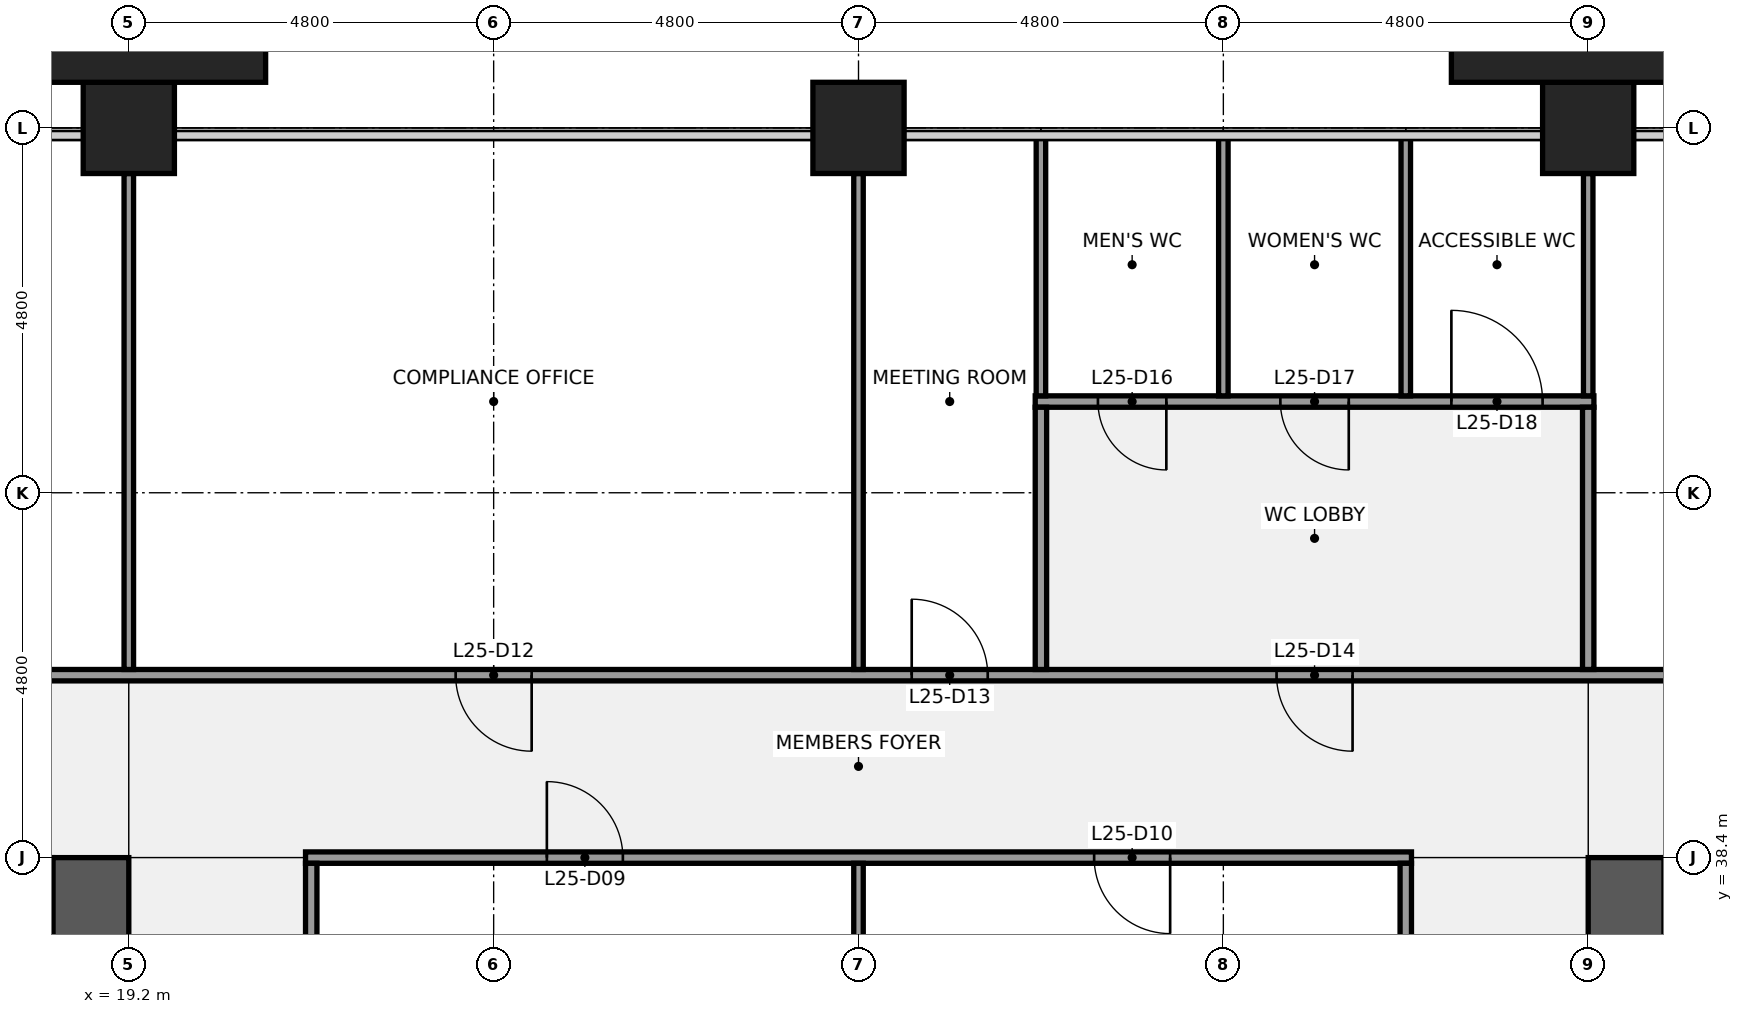
"""IFC4 building model, lengths in metres.
Left out: names, types, materials, properties, quantities, classifications, styles, units other than length and angle.
Written with IfcOpenShell. Run it as: python <this file> out.ifc"""

import sys

from ifc_helpers import new_model, si_unit, direction, frame, frame_2d, origin, origin_2d, place, context, subcontext, project, spatial, rectangle, extrude, element, fill, save


model = new_model("IFC4")
c1 = context("Model", 3, precision=1e-05, world=origin(), true_north=direction((0.0, 1.0)))
c2 = subcontext(c1, "Body", "Model", "MODEL_VIEW")
j1 = project(units=[si_unit("LENGTHUNIT", "METRE"), si_unit("PLANEANGLEUNIT", "RADIAN")], contexts=[c1])
p1 = place(None, origin())
s1 = spatial("IfcSite", under=j1, at=p1, CompositionType="ELEMENT")
p2 = place(p1, origin())
s2 = spatial("IfcBuilding", under=s1, at=p2, CompositionType="ELEMENT")
p3 = place(p2, frame((0.0, 0.0, 120.1)))
s3 = spatial("IfcBuildingStorey", under=s2, at=p3, CompositionType="ELEMENT", Elevation=120.1)
for number, where, z_axis, x_axis in (
    (1, (19.2, 48.0, 0.0), (0.0, 0.0, 1.0), (1.0, 0.0, 0.0)),
    (2, (28.8, 48.0, 0.0), (0.0, 0.0, 1.0), (1.0, 0.0, 0.0)),
    (3, (38.4, 48.0, 0.0), (0.0, 0.0, 1.0), (1.0, 0.0, 0.0)),
):
    element("IfcColumn", number, at=place(p3, frame(where, z_axis=z_axis, x_axis=x_axis)), inside=s3, PredefinedType="COLUMN", context=c2, shape_type="SweptSolid", body=[
        extrude(rectangle(XDim=1.2, YDim=1.2, at=origin_2d()), origin(), (0.0, 0.0, 1.0), 4.0),
    ])
p4 = place(p3, frame((18.7, 38.4, 0.0), z_axis=(0.0, 0.0, 1.0), x_axis=(0.0, -1.0, 0.0)))
e4 = element("IfcWall", 4, at=p4, inside=s3, PredefinedType="SHEAR", context=c2, shape_type="SweptSolid", body=[
    extrude(rectangle(XDim=28.8, YDim=1.0, at=frame_2d((14.4, 0.0))), origin(), (0.0, 0.0, 1.0), 3.84),
])
p5 = place(p4, frame((18.3, 0.0, 0.0)))
e5 = element("IfcOpeningElement", 5, at=p5, cuts=e4, PredefinedType="OPENING", context=c2, shape_type="SweptSolid", body=[
    extrude(rectangle(XDim=1.8, YDim=2.1, at=frame_2d((0.9, 1.05))), frame((0.0, 0.51, 0.0), z_axis=(0.0, -1.0, 0.0), x_axis=(1.0, 0.0, 0.0)), (0.0, 0.0, 1.0), 1.02),
])
p6 = place(p4, frame((8.7, 0.0, 0.0)))
e6 = element("IfcOpeningElement", 6, at=p6, cuts=e4, PredefinedType="OPENING", context=c2, shape_type="SweptSolid", body=[
    extrude(rectangle(XDim=1.8, YDim=2.1, at=frame_2d((0.9, 1.05))), frame((0.0, 0.51, 0.0), z_axis=(0.0, -1.0, 0.0), x_axis=(1.0, 0.0, 0.0)), (0.0, 0.0, 1.0), 1.02),
])
p7 = place(p3, frame((38.9, 9.6, 0.0), z_axis=(0.0, 0.0, 1.0), x_axis=(0.0, 1.0, 0.0)))
e7 = element("IfcWall", 7, at=p7, inside=s3, PredefinedType="SHEAR", context=c2, shape_type="SweptSolid", body=[
    extrude(rectangle(XDim=28.8, YDim=1.0, at=frame_2d((14.4, 0.0))), origin(), (0.0, 0.0, 1.0), 3.84),
])
p8 = place(p7, frame((8.7, 0.0, 0.0)))
e8 = element("IfcOpeningElement", 8, at=p8, cuts=e7, PredefinedType="OPENING", context=c2, shape_type="SweptSolid", body=[
    extrude(rectangle(XDim=1.8, YDim=2.1, at=frame_2d((0.9, 1.05))), frame((0.0, 0.51, 0.0), z_axis=(0.0, -1.0, 0.0), x_axis=(1.0, 0.0, 0.0)), (0.0, 0.0, 1.0), 1.02),
])
p9 = place(p7, frame((18.3, 0.0, 0.0)))
e9 = element("IfcOpeningElement", 9, at=p9, cuts=e7, PredefinedType="OPENING", context=c2, shape_type="SweptSolid", body=[
    extrude(rectangle(XDim=1.8, YDim=2.1, at=frame_2d((0.9, 1.05))), frame((0.0, 0.51, 0.0), z_axis=(0.0, -1.0, 0.0), x_axis=(1.0, 0.0, 0.0)), (0.0, 0.0, 1.0), 1.02),
])
p10 = place(p3, frame((21.525, 38.4, 0.0), z_axis=(0.0, 0.0, 1.0), x_axis=(1.0, 0.0, 0.0)))
e10 = element("IfcWall", 10, at=p10, inside=s3, PredefinedType="PARTITIONING", context=c2, shape_type="SweptSolid", body=[
    extrude(rectangle(XDim=14.55, YDim=0.15, at=frame_2d((7.275, 0.0))), origin(), (0.0, 0.0, 1.0), 2.936),
])
p11 = place(p10, frame((3.175, 0.0, 0.0)))
e11 = element("IfcOpeningElement", 11, at=p11, cuts=e10, PredefinedType="OPENING", context=c2, shape_type="SweptSolid", body=[
    extrude(rectangle(XDim=1.0, YDim=2.1, at=frame_2d((0.5, 1.05))), frame((0.0, 0.085, 0.0), z_axis=(0.0, -1.0, 0.0), x_axis=(1.0, 0.0, 0.0)), (0.0, 0.0, 1.0), 0.17),
])
p12 = place(p10, frame((10.375, 0.0, 0.0)))
e12 = element("IfcOpeningElement", 12, at=p12, cuts=e10, PredefinedType="OPENING", context=c2, shape_type="SweptSolid", body=[
    extrude(rectangle(XDim=1.0, YDim=2.1, at=frame_2d((0.5, 1.05))), frame((0.0, 0.085, 0.0), z_axis=(0.0, -1.0, 0.0), x_axis=(1.0, 0.0, 0.0)), (0.0, 0.0, 1.0), 0.17),
])
p13 = place(p3, frame((14.325, 40.8, 0.0), z_axis=(0.0, 0.0, 1.0), x_axis=(1.0, 0.0, 0.0)))
e13 = element("IfcWall", 13, at=p13, inside=s3, PredefinedType="PARTITIONING", context=c2, shape_type="SweptSolid", body=[
    extrude(rectangle(XDim=28.95, YDim=0.15, at=frame_2d((14.475, 0.0))), origin(), (0.0, 0.0, 1.0), 2.936),
])
p14 = place(p13, frame((1.975, 0.0, 0.0)))
e14 = element("IfcOpeningElement", 14, at=p14, cuts=e13, PredefinedType="OPENING", context=c2, shape_type="SweptSolid", body=[
    extrude(rectangle(XDim=1.0, YDim=2.1, at=frame_2d((0.5, 1.05))), frame((0.0, 0.085, 0.0), z_axis=(0.0, -1.0, 0.0), x_axis=(1.0, 0.0, 0.0)), (0.0, 0.0, 1.0), 0.17),
])
p15 = place(p13, frame((9.175, 0.0, 0.0)))
e15 = element("IfcOpeningElement", 15, at=p15, cuts=e13, PredefinedType="OPENING", context=c2, shape_type="SweptSolid", body=[
    extrude(rectangle(XDim=1.0, YDim=2.1, at=frame_2d((0.5, 1.05))), frame((0.0, 0.085, 0.0), z_axis=(0.0, -1.0, 0.0), x_axis=(1.0, 0.0, 0.0)), (0.0, 0.0, 1.0), 0.17),
])
p16 = place(p13, frame((15.175, 0.0, 0.0)))
e16 = element("IfcOpeningElement", 16, at=p16, cuts=e13, PredefinedType="OPENING", context=c2, shape_type="SweptSolid", body=[
    extrude(rectangle(XDim=1.0, YDim=2.1, at=frame_2d((0.5, 1.05))), frame((0.0, 0.085, 0.0), z_axis=(0.0, -1.0, 0.0), x_axis=(1.0, 0.0, 0.0)), (0.0, 0.0, 1.0), 0.17),
])
p17 = place(p13, frame((19.975, 0.0, 0.0)))
e17 = element("IfcOpeningElement", 17, at=p17, cuts=e13, PredefinedType="OPENING", context=c2, shape_type="SweptSolid", body=[
    extrude(rectangle(XDim=1.0, YDim=2.1, at=frame_2d((0.5, 1.05))), frame((0.0, 0.085, 0.0), z_axis=(0.0, -1.0, 0.0), x_axis=(1.0, 0.0, 0.0)), (0.0, 0.0, 1.0), 0.17),
])
p18 = place(p13, frame((25.975, 0.0, 0.0)))
e18 = element("IfcOpeningElement", 18, at=p18, cuts=e13, PredefinedType="OPENING", context=c2, shape_type="SweptSolid", body=[
    extrude(rectangle(XDim=1.0, YDim=2.1, at=frame_2d((0.5, 1.05))), frame((0.0, 0.085, 0.0), z_axis=(0.0, -1.0, 0.0), x_axis=(1.0, 0.0, 0.0)), (0.0, 0.0, 1.0), 0.17),
])
p19 = place(p3, frame((31.125, 44.4, 0.0), z_axis=(0.0, 0.0, 1.0), x_axis=(1.0, 0.0, 0.0)))
e19 = element("IfcWall", 19, at=p19, inside=s3, PredefinedType="PARTITIONING", context=c2, shape_type="SweptSolid", body=[
    extrude(rectangle(XDim=7.35, YDim=0.15, at=frame_2d((3.675, 0.0))), origin(), (0.0, 0.0, 1.0), 2.936),
])
p20 = place(p19, frame((0.825, 0.0, 0.0)))
e20 = element("IfcOpeningElement", 20, at=p20, cuts=e19, PredefinedType="OPENING", context=c2, shape_type="SweptSolid", body=[
    extrude(rectangle(XDim=0.9, YDim=2.1, at=frame_2d((0.45, 1.05))), frame((0.0, 0.085, 0.0), z_axis=(0.0, -1.0, 0.0), x_axis=(1.0, 0.0, 0.0)), (0.0, 0.0, 1.0), 0.17),
])
p21 = place(p19, frame((3.225, 0.0, 0.0)))
e21 = element("IfcOpeningElement", 21, at=p21, cuts=e19, PredefinedType="OPENING", context=c2, shape_type="SweptSolid", body=[
    extrude(rectangle(XDim=0.9, YDim=2.1, at=frame_2d((0.45, 1.05))), frame((0.0, 0.085, 0.0), z_axis=(0.0, -1.0, 0.0), x_axis=(1.0, 0.0, 0.0)), (0.0, 0.0, 1.0), 0.17),
])
p22 = place(p19, frame((5.475, 0.0, 0.0)))
e22 = element("IfcOpeningElement", 22, at=p22, cuts=e19, PredefinedType="OPENING", context=c2, shape_type="SweptSolid", body=[
    extrude(rectangle(XDim=1.2, YDim=2.1, at=frame_2d((0.6, 1.05))), frame((0.0, 0.085, 0.0), z_axis=(0.0, -1.0, 0.0), x_axis=(1.0, 0.0, 0.0)), (0.0, 0.0, 1.0), 0.17),
])
p23 = place(p3, frame((19.2, 40.875, 0.0), z_axis=(0.0, 0.0, 1.0), x_axis=(0.0, 1.0, 0.0)))
e23 = element("IfcWall", 23, at=p23, inside=s3, PredefinedType="PARTITIONING", context=c2, shape_type="SweptSolid", body=[
    extrude(rectangle(XDim=6.525, YDim=0.125, at=frame_2d((3.262, 0.0))), origin(), (0.0, 0.0, 1.0), 2.936),
])
p24 = place(p3, frame((21.6, 33.675, 0.0), z_axis=(0.0, 0.0, 1.0), x_axis=(0.0, 1.0, 0.0)))
e24 = element("IfcWall", 24, at=p24, inside=s3, PredefinedType="PARTITIONING", context=c2, shape_type="SweptSolid", body=[
    extrude(rectangle(XDim=4.65, YDim=0.15, at=frame_2d((2.325, 0.0))), origin(), (0.0, 0.0, 1.0), 2.936),
])
p25 = place(p3, frame((28.8, 33.663, 0.0), z_axis=(0.0, 0.0, 1.0), x_axis=(0.0, 1.0, 0.0)))
e25 = element("IfcWall", 25, at=p25, inside=s3, PredefinedType="PARTITIONING", context=c2, shape_type="SweptSolid", body=[
    extrude(rectangle(XDim=4.662, YDim=0.125, at=frame_2d((2.331, 0.0))), origin(), (0.0, 0.0, 1.0), 2.936),
])
p26 = place(p3, frame((28.8, 40.875, 0.0), z_axis=(0.0, 0.0, 1.0), x_axis=(0.0, 1.0, 0.0)))
e26 = element("IfcWall", 26, at=p26, inside=s3, PredefinedType="PARTITIONING", context=c2, shape_type="SweptSolid", body=[
    extrude(rectangle(XDim=6.525, YDim=0.125, at=frame_2d((3.262, 0.0))), origin(), (0.0, 0.0, 1.0), 2.936),
])
p27 = place(p3, frame((31.2, 44.475, 0.0), z_axis=(0.0, 0.0, 1.0), x_axis=(0.0, 1.0, 0.0)))
e27 = element("IfcWall", 27, at=p27, inside=s3, PredefinedType="PARTITIONING", context=c2, shape_type="SweptSolid", body=[
    extrude(rectangle(XDim=3.425, YDim=0.125, at=frame_2d((1.712, 0.0))), origin(), (0.0, 0.0, 1.0), 2.936),
])
p28 = place(p3, frame((31.2, 40.875, 0.0), z_axis=(0.0, 0.0, 1.0), x_axis=(0.0, 1.0, 0.0)))
e28 = element("IfcWall", 28, at=p28, inside=s3, PredefinedType="PARTITIONING", context=c2, shape_type="SweptSolid", body=[
    extrude(rectangle(XDim=3.45, YDim=0.15, at=frame_2d((1.725, 0.0))), origin(), (0.0, 0.0, 1.0), 2.936),
])
for number, where, z_axis, x_axis in (
    (29, (33.6, 44.475, 0.0), (0.0, 0.0, 1.0), (0.0, 1.0, 0.0)),
    (30, (36.0, 44.475, 0.0), (0.0, 0.0, 1.0), (0.0, 1.0, 0.0)),
):
    element("IfcWall", number, at=place(p3, frame(where, z_axis=z_axis, x_axis=x_axis)), inside=s3, PredefinedType="PARTITIONING", context=c2, shape_type="SweptSolid", body=[
        extrude(rectangle(XDim=3.425, YDim=0.125, at=frame_2d((1.712, 0.0))), origin(), (0.0, 0.0, 1.0), 2.936),
    ])
p29 = place(p3, frame((36.0, 33.675, 0.0), z_axis=(0.0, 0.0, 1.0), x_axis=(0.0, 1.0, 0.0)))
e31 = element("IfcWall", 31, at=p29, inside=s3, PredefinedType="PARTITIONING", context=c2, shape_type="SweptSolid", body=[
    extrude(rectangle(XDim=4.65, YDim=0.15, at=frame_2d((2.325, 0.0))), origin(), (0.0, 0.0, 1.0), 2.936),
])
p30 = place(p3, frame((38.4, 44.475, 0.0), z_axis=(0.0, 0.0, 1.0), x_axis=(0.0, 1.0, 0.0)))
e32 = element("IfcWall", 32, at=p30, inside=s3, PredefinedType="PARTITIONING", context=c2, shape_type="SweptSolid", body=[
    extrude(rectangle(XDim=2.925, YDim=0.125, at=frame_2d((1.462, 0.0))), origin(), (0.0, 0.0, 1.0), 2.936),
])
p31 = place(p3, frame((38.4, 40.875, 0.0), z_axis=(0.0, 0.0, 1.0), x_axis=(0.0, 1.0, 0.0)))
e33 = element("IfcWall", 33, at=p31, inside=s3, PredefinedType="PARTITIONING", context=c2, shape_type="SweptSolid", body=[
    extrude(rectangle(XDim=3.45, YDim=0.15, at=frame_2d((1.725, 0.0))), origin(), (0.0, 0.0, 1.0), 2.936),
])
for number, where, z_axis, x_axis in (
    (34, (19.2, 49.05, 0.0), (0.0, 0.0, 1.0), (1.0, 0.0, 0.0)),
    (35, (38.4, 49.05, 0.0), (0.0, 0.0, 1.0), (1.0, 0.0, 0.0)),
):
    element("IfcColumn", number, at=place(p3, frame(where, z_axis=z_axis, x_axis=x_axis)), inside=s3, PredefinedType="PILASTER", context=c2, shape_type="SweptSolid", body=[
        extrude(rectangle(XDim=3.6, YDim=0.9, at=origin_2d()), origin(), (0.0, 0.0, 1.0), 4.0),
    ])
p32 = place(p11, origin())
e36 = element("IfcDoor", 36, at=p32, inside=s3, OperationType="SINGLE_SWING_LEFT", PredefinedType="DOOR", context=c2, shape_type="SweptSolid", body=[
    extrude(rectangle(XDim=1.0, YDim=2.1, at=frame_2d((0.5, 1.05))), frame((0.0, 0.025, 0.0), z_axis=(0.0, -1.0, 0.0), x_axis=(1.0, 0.0, 0.0)), (0.0, 0.0, 1.0), 0.05),
])
fill(e11, e36)
p33 = place(p12, origin())
e37 = element("IfcDoor", 37, at=p33, inside=s3, OperationType="SINGLE_SWING_RIGHT", PredefinedType="DOOR", context=c2, shape_type="SweptSolid", body=[
    extrude(rectangle(XDim=1.0, YDim=2.1, at=frame_2d((0.5, 1.05))), frame((0.0, 0.025, 0.0), z_axis=(0.0, -1.0, 0.0), x_axis=(1.0, 0.0, 0.0)), (0.0, 0.0, 1.0), 0.05),
])
fill(e12, e37)
p34 = place(p15, origin())
e38 = element("IfcDoor", 38, at=p34, inside=s3, OperationType="SINGLE_SWING_RIGHT", PredefinedType="DOOR", context=c2, shape_type="SweptSolid", body=[
    extrude(rectangle(XDim=1.0, YDim=2.1, at=frame_2d((0.5, 1.05))), frame((0.0, 0.025, 0.0), z_axis=(0.0, -1.0, 0.0), x_axis=(1.0, 0.0, 0.0)), (0.0, 0.0, 1.0), 0.05),
])
fill(e15, e38)
p35 = place(p16, origin())
e39 = element("IfcDoor", 39, at=p35, inside=s3, OperationType="SINGLE_SWING_LEFT", PredefinedType="DOOR", context=c2, shape_type="SweptSolid", body=[
    extrude(rectangle(XDim=1.0, YDim=2.1, at=frame_2d((0.5, 1.05))), frame((0.0, 0.025, 0.0), z_axis=(0.0, -1.0, 0.0), x_axis=(1.0, 0.0, 0.0)), (0.0, 0.0, 1.0), 0.05),
])
fill(e16, e39)
p36 = place(p17, origin())
e40 = element("IfcDoor", 40, at=p36, inside=s3, OperationType="SINGLE_SWING_RIGHT", PredefinedType="DOOR", context=c2, shape_type="SweptSolid", body=[
    extrude(rectangle(XDim=1.0, YDim=2.1, at=frame_2d((0.5, 1.05))), frame((0.0, 0.025, 0.0), z_axis=(0.0, -1.0, 0.0), x_axis=(1.0, 0.0, 0.0)), (0.0, 0.0, 1.0), 0.05),
])
fill(e17, e40)
p37 = place(p20, origin())
e41 = element("IfcDoor", 41, at=p37, inside=s3, OperationType="SINGLE_SWING_RIGHT", PredefinedType="DOOR", context=c2, shape_type="SweptSolid", body=[
    extrude(rectangle(XDim=0.9, YDim=2.1, at=frame_2d((0.45, 1.05))), frame((0.0, 0.025, 0.0), z_axis=(0.0, -1.0, 0.0), x_axis=(1.0, 0.0, 0.0)), (0.0, 0.0, 1.0), 0.05),
])
fill(e20, e41)
p38 = place(p21, origin())
e42 = element("IfcDoor", 42, at=p38, inside=s3, OperationType="SINGLE_SWING_RIGHT", PredefinedType="DOOR", context=c2, shape_type="SweptSolid", body=[
    extrude(rectangle(XDim=0.9, YDim=2.1, at=frame_2d((0.45, 1.05))), frame((0.0, 0.025, 0.0), z_axis=(0.0, -1.0, 0.0), x_axis=(1.0, 0.0, 0.0)), (0.0, 0.0, 1.0), 0.05),
])
fill(e21, e42)
p39 = place(p22, origin())
e43 = element("IfcDoor", 43, at=p39, inside=s3, OperationType="SINGLE_SWING_LEFT", PredefinedType="DOOR", context=c2, shape_type="SweptSolid", body=[
    extrude(rectangle(XDim=1.2, YDim=2.1, at=frame_2d((0.6, 1.05))), frame((0.0, 0.025, 0.0), z_axis=(0.0, -1.0, 0.0), x_axis=(1.0, 0.0, 0.0)), (0.0, 0.0, 1.0), 0.05),
])
fill(e22, e43)
save(model, sys.argv[1])
